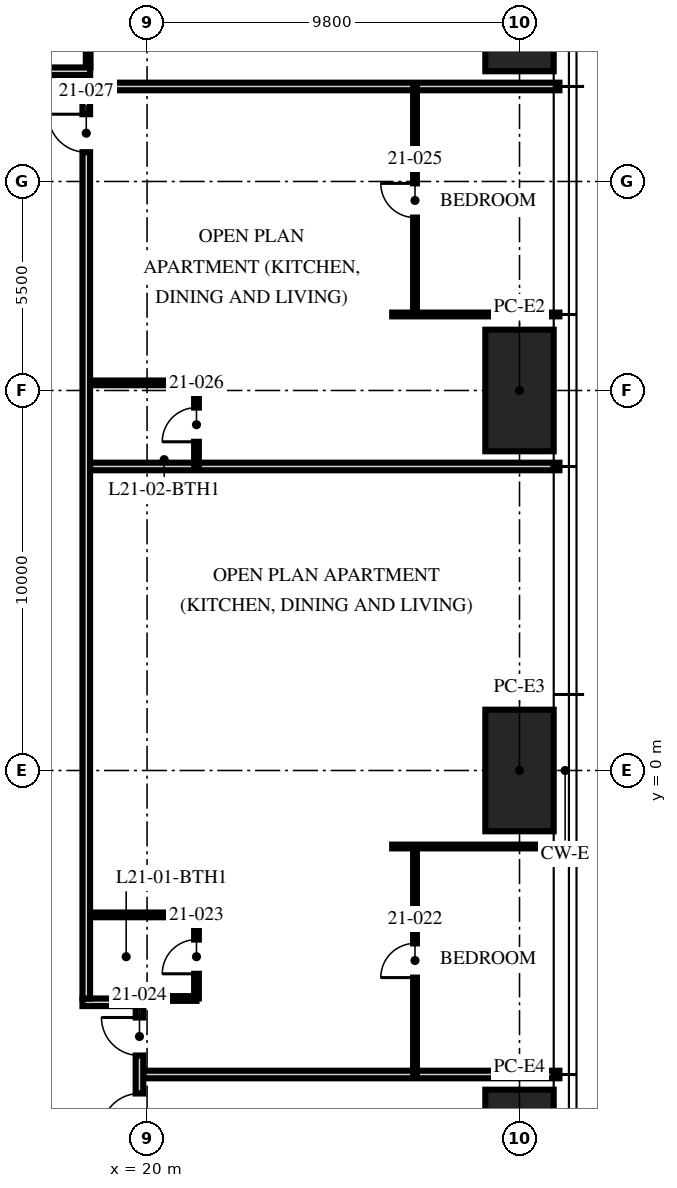
"""IFC4 building model, lengths in metres.
Left out: names, types, materials, properties, quantities, classifications, styles, units other than length and angle.
Written with IfcOpenShell. Run it as: python <this file> out.ifc"""

import sys

from ifc_helpers import new_model, si_unit, direction, frame, frame_2d, origin, origin_2d, place, context, subcontext, project, spatial, rectangle, hollow_rectangle, extrude, element, fill, save


model = new_model("IFC4")
c1 = context("Model", 3, precision=1e-05, world=origin(), true_north=direction((0.0, 1.0)))
c2 = subcontext(c1, "Body", "Model", "MODEL_VIEW")
j1 = project(units=[si_unit("LENGTHUNIT", "METRE"), si_unit("PLANEANGLEUNIT", "RADIAN")], contexts=[c1])
p1 = place(None, origin())
s1 = spatial("IfcSite", under=j1, at=p1, CompositionType="ELEMENT")
p2 = place(p1, origin())
s2 = spatial("IfcBuilding", under=s1, at=p2, CompositionType="ELEMENT")
p3 = place(p2, frame((0.0, 0.0, 84.75)))
s3 = spatial("IfcBuildingStorey", under=s2, at=p3, CompositionType="ELEMENT", Elevation=84.75)
for number, where, z_axis, x_axis in (
    (1, (29.8, 20.0, 0.0), (0.0, 0.0, 1.0), (0.0, 1.0, 0.0)),
    (2, (29.8, 10.0, 0.0), (0.0, 0.0, 1.0), (0.0, 1.0, 0.0)),
    (3, (29.8, 0.0, 0.0), (0.0, 0.0, 1.0), (0.0, 1.0, 0.0)),
    (4, (29.8, -10.0, 0.0), (0.0, 0.0, 1.0), (0.0, 1.0, 0.0)),
):
    element("IfcColumn", number, at=place(p3, frame(where, z_axis=z_axis, x_axis=x_axis)), inside=s3, PredefinedType="COLUMN", context=c2, shape_type="SweptSolid", body=[
        extrude(hollow_rectangle(XDim=3.2, YDim=1.8, WallThickness=0.2, at=origin_2d()), origin(), (0.0, 0.0, 1.0), 3.75),
    ])
p4 = place(p3, frame((19.9, -8.0, 0.0), z_axis=(0.0, 0.0, 1.0), x_axis=(1.0, 0.0, 0.0)))
e5 = element("IfcWall", 5, at=p4, inside=s3, PredefinedType="PARTITIONING", context=c2, shape_type="SweptSolid", body=[
    extrude(rectangle(XDim=10.95, YDim=0.2, at=frame_2d((5.475, 0.0))), origin(), (0.0, 0.0, 1.0), 2.71),
])
p5 = place(p3, frame((26.45, -2.0, 0.0), z_axis=(0.0, 0.0, 1.0), x_axis=(1.0, 0.0, 0.0)))
e6 = element("IfcWall", 6, at=p5, inside=s3, PredefinedType="PARTITIONING", context=c2, shape_type="SweptSolid", body=[
    extrude(rectangle(XDim=4.4, YDim=0.1, at=frame_2d((2.2, 0.0))), origin(), (0.0, 0.0, 1.0), 2.71),
])
p6 = place(p3, frame((18.5, 8.0, 0.0), z_axis=(0.0, 0.0, 1.0), x_axis=(1.0, 0.0, 0.0)))
e7 = element("IfcWall", 7, at=p6, inside=s3, PredefinedType="PARTITIONING", context=c2, shape_type="SweptSolid", body=[
    extrude(rectangle(XDim=12.35, YDim=0.2, at=frame_2d((6.175, 0.0))), origin(), (0.0, 0.0, 1.0), 2.71),
])
p7 = place(p3, frame((26.45, 12.0, 0.0), z_axis=(0.0, 0.0, 1.0), x_axis=(1.0, 0.0, 0.0)))
e8 = element("IfcWall", 8, at=p7, inside=s3, PredefinedType="PARTITIONING", context=c2, shape_type="SweptSolid", body=[
    extrude(rectangle(XDim=4.4, YDim=0.1, at=frame_2d((2.2, 0.0))), origin(), (0.0, 0.0, 1.0), 2.71),
])
p8 = place(p3, frame((18.5, 18.0, 0.0), z_axis=(0.0, 0.0, 1.0), x_axis=(1.0, 0.0, 0.0)))
e9 = element("IfcWall", 9, at=p8, inside=s3, PredefinedType="PARTITIONING", context=c2, shape_type="SweptSolid", body=[
    extrude(rectangle(XDim=12.35, YDim=0.2, at=frame_2d((6.175, 0.0))), origin(), (0.0, 0.0, 1.0), 2.3),
])
p9 = place(p3, frame((27.05, -8.0, 0.0), z_axis=(0.0, 0.0, 1.0), x_axis=(0.0, 1.0, 0.0)))
e10 = element("IfcWall", 10, at=p9, inside=s3, PredefinedType="PARTITIONING", context=c2, shape_type="SweptSolid", body=[
    extrude(rectangle(XDim=6.0, YDim=0.1, at=frame_2d((3.0, 0.0))), origin(), (0.0, 0.0, 1.0), 2.61),
])
p10 = place(p9, frame((2.55, 0.0, 0.0)))
e11 = element("IfcOpeningElement", 11, at=p10, cuts=e10, PredefinedType="OPENING", context=c2, shape_type="SweptSolid", body=[
    extrude(rectangle(XDim=0.9, YDim=2.1, at=frame_2d((0.45, 1.05))), frame((0.0, 0.06, 0.0), z_axis=(0.0, -1.0, 0.0), x_axis=(1.0, 0.0, 0.0)), (0.0, 0.0, 1.0), 0.12),
])
p11 = place(p3, frame((21.3, -6.0, 0.0), z_axis=(0.0, 0.0, 1.0), x_axis=(0.0, 1.0, 0.0)))
e12 = element("IfcWall", 12, at=p11, inside=s3, PredefinedType="PARTITIONING", context=c2, shape_type="SweptSolid", body=[
    extrude(rectangle(XDim=2.2, YDim=0.125, at=frame_2d((1.1, 0.0))), origin(), (0.0, 0.0, 1.0), 2.61),
])
p12 = place(p11, frame((0.65, 0.0, 0.0)))
e13 = element("IfcOpeningElement", 13, at=p12, cuts=e12, PredefinedType="OPENING", context=c2, shape_type="SweptSolid", body=[
    extrude(rectangle(XDim=0.9, YDim=2.1, at=frame_2d((0.45, 1.05))), frame((0.0, 0.073, 0.0), z_axis=(0.0, -1.0, 0.0), x_axis=(1.0, 0.0, 0.0)), (0.0, 0.0, 1.0), 0.145),
])
p13 = place(p3, frame((19.97, -6.0, 0.0), z_axis=(0.0, 0.0, 1.0), x_axis=(1.0, 0.0, 0.0)))
e14 = element("IfcWall", 14, at=p13, inside=s3, PredefinedType="PARTITIONING", context=c2, shape_type="SweptSolid", body=[
    extrude(rectangle(XDim=1.33, YDim=0.125, at=frame_2d((0.665, 0.0))), origin(), (0.0, 0.0, 1.0), 3.5),
])
p14 = place(p3, frame((18.5, -3.8, 0.0), z_axis=(0.0, 0.0, 1.0), x_axis=(1.0, 0.0, 0.0)))
e15 = element("IfcWall", 15, at=p14, inside=s3, PredefinedType="PARTITIONING", context=c2, shape_type="SweptSolid", body=[
    extrude(rectangle(XDim=2.8, YDim=0.125, at=frame_2d((1.4, 0.0))), origin(), (0.0, 0.0, 1.0), 3.5),
])
p15 = place(p3, frame((27.05, 12.0, 0.0), z_axis=(0.0, 0.0, 1.0), x_axis=(0.0, 1.0, 0.0)))
e16 = element("IfcWall", 16, at=p15, inside=s3, PredefinedType="PARTITIONING", context=c2, shape_type="SweptSolid", body=[
    extrude(rectangle(XDim=6.0, YDim=0.1, at=frame_2d((3.0, 0.0))), origin(), (0.0, 0.0, 1.0), 2.61),
])
p16 = place(p15, frame((2.55, 0.0, 0.0)))
e17 = element("IfcOpeningElement", 17, at=p16, cuts=e16, PredefinedType="OPENING", context=c2, shape_type="SweptSolid", body=[
    extrude(rectangle(XDim=0.9, YDim=2.1, at=frame_2d((0.45, 1.05))), frame((0.0, 0.06, 0.0), z_axis=(0.0, -1.0, 0.0), x_axis=(1.0, 0.0, 0.0)), (0.0, 0.0, 1.0), 0.12),
])
p17 = place(p3, frame((21.3, 8.0, 0.0), z_axis=(0.0, 0.0, 1.0), x_axis=(0.0, 1.0, 0.0)))
e18 = element("IfcWall", 18, at=p17, inside=s3, PredefinedType="PARTITIONING", context=c2, shape_type="SweptSolid", body=[
    extrude(rectangle(XDim=2.2, YDim=0.125, at=frame_2d((1.1, 0.0))), origin(), (0.0, 0.0, 1.0), 2.492),
])
p18 = place(p17, frame((0.65, 0.0, 0.0)))
e19 = element("IfcOpeningElement", 19, at=p18, cuts=e18, PredefinedType="OPENING", context=c2, shape_type="SweptSolid", body=[
    extrude(rectangle(XDim=0.9, YDim=2.1, at=frame_2d((0.45, 1.05))), frame((0.0, 0.073, 0.0), z_axis=(0.0, -1.0, 0.0), x_axis=(1.0, 0.0, 0.0)), (0.0, 0.0, 1.0), 0.145),
])
p19 = place(p3, frame((18.5, 10.2, 0.0), z_axis=(0.0, 0.0, 1.0), x_axis=(1.0, 0.0, 0.0)))
e20 = element("IfcWall", 20, at=p19, inside=s3, PredefinedType="PARTITIONING", context=c2, shape_type="SweptSolid", body=[
    extrude(rectangle(XDim=2.8, YDim=0.125, at=frame_2d((1.4, 0.0))), origin(), (0.0, 0.0, 1.0), 2.492),
])
p20 = place(p3, frame((18.45, 18.5, 0.0), z_axis=(0.0, 0.0, 1.0), x_axis=(0.0, 1.0, 0.0)))
e21 = element("IfcWall", 21, at=p20, inside=s3, PredefinedType="PARTITIONING", context=c2, shape_type="SweptSolid", body=[
    extrude(rectangle(XDim=2.8, YDim=0.125, at=frame_2d((1.4, 0.0))), origin(), (0.0, 0.0, 1.0), 2.3),
])
p21 = place(p3, frame((18.3, -6.1, 0.0), z_axis=(0.0, 0.0, 1.0), x_axis=(1.0, 0.0, 0.0)))
e22 = element("IfcWall", 22, at=p21, inside=s3, PredefinedType="PARTITIONING", context=c2, shape_type="SweptSolid", body=[
    extrude(rectangle(XDim=1.6, YDim=0.2, at=frame_2d((0.8, 0.0))), origin(), (0.0, 0.0, 1.0), 3.5),
])
p22 = place(p3, frame((19.8, -9.8, 0.0), z_axis=(0.0, 0.0, 1.0), x_axis=(0.0, 1.0, 0.0)))
e23 = element("IfcWall", 23, at=p22, inside=s3, PredefinedType="PARTITIONING", context=c2, shape_type="SweptSolid", body=[
    extrude(rectangle(XDim=3.6, YDim=0.2, at=frame_2d((1.8, 0.0))), origin(), (0.0, 0.0, 1.0), 3.5),
])
p23 = place(p22, frame((2.3, 0.0, 0.0)))
e24 = element("IfcOpeningElement", 24, at=p23, cuts=e23, PredefinedType="OPENING", context=c2, shape_type="SweptSolid", body=[
    extrude(rectangle(XDim=1.0, YDim=2.2, at=frame_2d((0.5, 1.1))), frame((0.0, 0.11, 0.0), z_axis=(0.0, -1.0, 0.0), x_axis=(1.0, 0.0, 0.0)), (0.0, 0.0, 1.0), 0.22),
])
p24 = place(p22, frame((0.3, 0.0, 0.0)))
e25 = element("IfcOpeningElement", 25, at=p24, cuts=e23, PredefinedType="OPENING", context=c2, shape_type="SweptSolid", body=[
    extrude(rectangle(XDim=1.0, YDim=2.2, at=frame_2d((0.5, 1.1))), frame((0.0, 0.11, 0.0), z_axis=(0.0, -1.0, 0.0), x_axis=(1.0, 0.0, 0.0)), (0.0, 0.0, 1.0), 0.22),
])
p25 = place(p3, frame((18.4, -6.0, 0.0), z_axis=(0.0, 0.0, 1.0), x_axis=(0.0, 1.0, 0.0)))
e26 = element("IfcWall", 26, at=p25, inside=s3, PredefinedType="PARTITIONING", context=c2, shape_type="SweptSolid", body=[
    extrude(rectangle(XDim=24.3, YDim=0.2, at=frame_2d((12.15, 0.0))), origin(), (0.0, 0.0, 1.0), 2.3),
])
p26 = place(p25, frame((22.27, 0.0, 0.0)))
e27 = element("IfcOpeningElement", 27, at=p26, cuts=e26, PredefinedType="OPENING", context=c2, shape_type="SweptSolid", body=[
    extrude(rectangle(XDim=1.0, YDim=2.2, at=frame_2d((0.5, 1.1))), frame((0.0, 0.11, 0.0), z_axis=(0.0, -1.0, 0.0), x_axis=(1.0, 0.0, 0.0)), (0.0, 0.0, 1.0), 0.22),
])
p27 = place(p3, frame((10.0, 18.4, 0.0), z_axis=(0.0, 0.0, 1.0), x_axis=(1.0, 0.0, 0.0)))
e28 = element("IfcWall", 28, at=p27, inside=s3, PredefinedType="PARTITIONING", context=c2, shape_type="SweptSolid", body=[
    extrude(rectangle(XDim=8.5, YDim=0.2, at=frame_2d((4.25, 0.0))), origin(), (0.0, 0.0, 1.0), 2.3),
])
p28 = place(p10, origin())
e29 = element("IfcDoor", 29, at=p28, inside=s3, OperationType="SINGLE_SWING_LEFT", PredefinedType="DOOR", context=c2, shape_type="SweptSolid", body=[
    extrude(rectangle(XDim=0.9, YDim=2.1, at=frame_2d((0.45, 1.05))), frame((0.0, 0.025, 0.0), z_axis=(0.0, -1.0, 0.0), x_axis=(1.0, 0.0, 0.0)), (0.0, 0.0, 1.0), 0.05),
])
fill(e11, e29)
p29 = place(p12, origin())
e30 = element("IfcDoor", 30, at=p29, inside=s3, OperationType="SINGLE_SWING_LEFT", PredefinedType="DOOR", context=c2, shape_type="SweptSolid", body=[
    extrude(rectangle(XDim=0.9, YDim=2.1, at=frame_2d((0.45, 1.05))), frame((0.0, 0.025, 0.0), z_axis=(0.0, -1.0, 0.0), x_axis=(1.0, 0.0, 0.0)), (0.0, 0.0, 1.0), 0.05),
])
fill(e13, e30)
p30 = place(p23, origin())
e31 = element("IfcDoor", 31, at=p30, inside=s3, OperationType="SINGLE_SWING_RIGHT", PredefinedType="DOOR", context=c2, shape_type="SweptSolid", body=[
    extrude(rectangle(XDim=1.0, YDim=2.2, at=frame_2d((0.5, 1.1))), frame((0.0, 0.025, 0.0), z_axis=(0.0, -1.0, 0.0), x_axis=(1.0, 0.0, 0.0)), (0.0, 0.0, 1.0), 0.05),
])
fill(e24, e31)
p31 = place(p16, origin())
e32 = element("IfcDoor", 32, at=p31, inside=s3, OperationType="SINGLE_SWING_RIGHT", PredefinedType="DOOR", context=c2, shape_type="SweptSolid", body=[
    extrude(rectangle(XDim=0.9, YDim=2.1, at=frame_2d((0.45, 1.05))), frame((0.0, 0.025, 0.0), z_axis=(0.0, -1.0, 0.0), x_axis=(1.0, 0.0, 0.0)), (0.0, 0.0, 1.0), 0.05),
])
fill(e17, e32)
p32 = place(p18, origin())
e33 = element("IfcDoor", 33, at=p32, inside=s3, OperationType="SINGLE_SWING_LEFT", PredefinedType="DOOR", context=c2, shape_type="SweptSolid", body=[
    extrude(rectangle(XDim=0.9, YDim=2.1, at=frame_2d((0.45, 1.05))), frame((0.0, 0.025, 0.0), z_axis=(0.0, -1.0, 0.0), x_axis=(1.0, 0.0, 0.0)), (0.0, 0.0, 1.0), 0.05),
])
fill(e19, e33)
p33 = place(p26, origin())
e34 = element("IfcDoor", 34, at=p33, inside=s3, OperationType="SINGLE_SWING_RIGHT", PredefinedType="DOOR", context=c2, shape_type="SweptSolid", body=[
    extrude(rectangle(XDim=1.0, YDim=2.2, at=frame_2d((0.5, 1.1))), frame((0.0, 0.025, 0.0), z_axis=(0.0, -1.0, 0.0), x_axis=(1.0, 0.0, 0.0)), (0.0, 0.0, 1.0), 0.05),
])
fill(e27, e34)
p34 = place(p24, origin())
e35 = element("IfcDoor", 35, at=p34, inside=s3, OperationType="SINGLE_SWING_LEFT", PredefinedType="DOOR", context=c2, shape_type="SweptSolid", body=[
    extrude(rectangle(XDim=1.0, YDim=2.2, at=frame_2d((0.5, 1.1))), frame((0.0, 0.025, 0.0), z_axis=(0.0, -1.0, 0.0), x_axis=(1.0, 0.0, 0.0)), (0.0, 0.0, 1.0), 0.05),
])
fill(e25, e35)
save(model, sys.argv[1])
